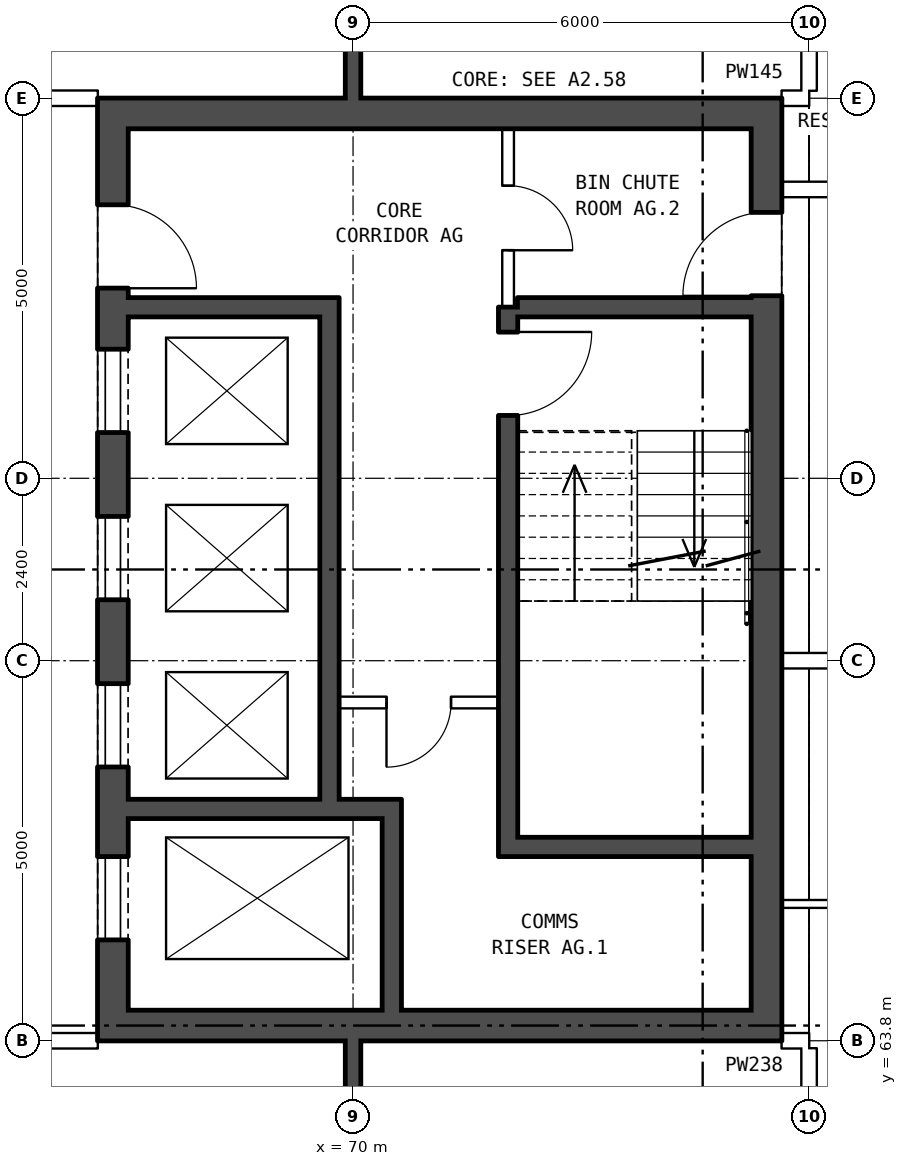
"""IFC4 building model, lengths in metres.
Left out: names, types, materials, properties, quantities, classifications, styles, units other than length and angle.
Written with IfcOpenShell. Run it as: python <this file> out.ifc"""

import sys

from ifc_helpers import new_model, si_unit, direction, frame, frame_2d, origin, place, context, subcontext, project, spatial, rectangle, extrude, element, fill, save


model = new_model("IFC4")
c1 = context("Model", 3, precision=1e-05, world=origin(), true_north=direction((0.0, 1.0)))
c2 = subcontext(c1, "Body", "Model", "MODEL_VIEW")
j1 = project(units=[si_unit("LENGTHUNIT", "METRE"), si_unit("PLANEANGLEUNIT", "RADIAN")], contexts=[c1])
p1 = place(None, origin())
s1 = spatial("IfcSite", under=j1, at=p1, CompositionType="ELEMENT")
p2 = place(p1, origin())
s2 = spatial("IfcBuilding", under=s1, at=p2, CompositionType="ELEMENT")
p3 = place(p2, frame((0.0, 0.0, 202.8)))
s3 = spatial("IfcBuildingStorey", under=s2, at=p3, CompositionType="ELEMENT", Elevation=202.8)
p4 = place(p3, frame((66.84, 63.8, 0.0), z_axis=(0.0, 0.0, 1.0), x_axis=(0.0, 1.0, 0.0)))
e1 = element("IfcWall", 1, at=p4, inside=s3, PredefinedType="SHEAR", context=c2, shape_type="SweptSolid", body=[
    extrude(rectangle(XDim=12.4, YDim=0.4, at=frame_2d((6.2, 0.0))), origin(), (0.0, 0.0, 1.0), 2.85),
])
p5 = place(p4, frame((1.325, 0.0, 0.0)))
e2 = element("IfcOpeningElement", 2, at=p5, cuts=e1, PredefinedType="OPENING", context=c2, shape_type="SweptSolid", body=[
    extrude(rectangle(XDim=1.1, YDim=2.1, at=frame_2d((0.55, 1.05))), frame((0.0, 0.21, 0.0), z_axis=(0.0, -1.0, 0.0), x_axis=(1.0, 0.0, 0.0)), (0.0, 0.0, 1.0), 0.42),
])
p6 = place(p4, frame((3.6, 0.0, 0.0)))
e3 = element("IfcOpeningElement", 3, at=p6, cuts=e1, PredefinedType="OPENING", context=c2, shape_type="SweptSolid", body=[
    extrude(rectangle(XDim=1.1, YDim=2.1, at=frame_2d((0.55, 1.05))), frame((0.0, 0.21, 0.0), z_axis=(0.0, -1.0, 0.0), x_axis=(1.0, 0.0, 0.0)), (0.0, 0.0, 1.0), 0.42),
])
p7 = place(p4, frame((5.8, 0.0, 0.0)))
e4 = element("IfcOpeningElement", 4, at=p7, cuts=e1, PredefinedType="OPENING", context=c2, shape_type="SweptSolid", body=[
    extrude(rectangle(XDim=1.1, YDim=2.1, at=frame_2d((0.55, 1.05))), frame((0.0, 0.21, 0.0), z_axis=(0.0, -1.0, 0.0), x_axis=(1.0, 0.0, 0.0)), (0.0, 0.0, 1.0), 0.42),
])
p8 = place(p4, frame((8.0, 0.0, 0.0)))
e5 = element("IfcOpeningElement", 5, at=p8, cuts=e1, PredefinedType="OPENING", context=c2, shape_type="SweptSolid", body=[
    extrude(rectangle(XDim=1.1, YDim=2.1, at=frame_2d((0.55, 1.05))), frame((0.0, 0.21, 0.0), z_axis=(0.0, -1.0, 0.0), x_axis=(1.0, 0.0, 0.0)), (0.0, 0.0, 1.0), 0.42),
])
p9 = place(p4, frame((9.9, 0.0, 0.0)))
e6 = element("IfcOpeningElement", 6, at=p9, cuts=e1, PredefinedType="OPENING", context=c2, shape_type="SweptSolid", body=[
    extrude(rectangle(XDim=1.1, YDim=2.1, at=frame_2d((0.55, 1.05))), frame((0.0, 0.21, 0.0), z_axis=(0.0, -1.0, 0.0), x_axis=(1.0, 0.0, 0.0)), (0.0, 0.0, 1.0), 0.42),
])
p10 = place(p3, frame((75.44, 63.8, 0.0), z_axis=(0.0, 0.0, 1.0), x_axis=(0.0, 1.0, 0.0)))
e7 = element("IfcWall", 7, at=p10, inside=s3, PredefinedType="SHEAR", context=c2, shape_type="SweptSolid", body=[
    extrude(rectangle(XDim=12.4, YDim=0.4, at=frame_2d((6.2, 0.0))), origin(), (0.0, 0.0, 1.0), 2.85),
])
p11 = place(p10, frame((9.8, 0.0, 0.0)))
e8 = element("IfcOpeningElement", 8, at=p11, cuts=e7, PredefinedType="OPENING", context=c2, shape_type="SweptSolid", body=[
    extrude(rectangle(XDim=1.1, YDim=2.1, at=frame_2d((0.55, 1.05))), frame((0.0, 0.21, 0.0), z_axis=(0.0, -1.0, 0.0), x_axis=(1.0, 0.0, 0.0)), (0.0, 0.0, 1.0), 0.42),
])
for number, where, z_axis, x_axis in (
    (9, (67.04, 64.0, 0.0), (0.0, 0.0, 1.0), (1.0, 0.0, 0.0)),
    (10, (67.04, 76.0, 0.0), (0.0, 0.0, 1.0), (1.0, 0.0, 0.0)),
):
    element("IfcWall", number, at=place(p3, frame(where, z_axis=z_axis, x_axis=x_axis)), inside=s3, PredefinedType="SHEAR", context=c2, shape_type="SweptSolid", body=[
        extrude(rectangle(XDim=8.2, YDim=0.4, at=frame_2d((4.1, 0.0))), origin(), (0.0, 0.0, 1.0), 2.85),
    ])
p12 = place(p3, frame((72.165, 66.35, 0.0), z_axis=(0.0, 0.0, 1.0), x_axis=(1.0, 0.0, 0.0)))
e11 = element("IfcWall", 11, at=p12, inside=s3, PredefinedType="SHEAR", context=c2, shape_type="SweptSolid", body=[
    extrude(rectangle(XDim=3.075, YDim=0.25, at=frame_2d((1.538, 0.0))), origin(), (0.0, 0.0, 1.0), 2.85),
])
p13 = place(p3, frame((67.04, 66.85, 0.0), z_axis=(0.0, 0.0, 1.0), x_axis=(1.0, 0.0, 0.0)))
e12 = element("IfcWall", 12, at=p13, inside=s3, PredefinedType="SHEAR", context=c2, shape_type="SweptSolid", body=[
    extrude(rectangle(XDim=3.595, YDim=0.25, at=frame_2d((1.797, 0.0))), origin(), (0.0, 0.0, 1.0), 2.85),
])
p14 = place(p3, frame((69.815, 68.25, 0.0), z_axis=(0.0, 0.0, 1.0), x_axis=(1.0, 0.0, 0.0)))
e13 = element("IfcWall", 13, at=p14, inside=s3, PredefinedType="PARTITIONING", context=c2, shape_type="SweptSolid", body=[
    extrude(rectangle(XDim=2.1, YDim=0.15, at=frame_2d((1.05, 0.0))), origin(), (0.0, 0.0, 1.0), 2.85),
])
p15 = place(p14, frame((0.625, 0.0, 0.0)))
e14 = element("IfcOpeningElement", 14, at=p15, cuts=e13, PredefinedType="OPENING", context=c2, shape_type="SweptSolid", body=[
    extrude(rectangle(XDim=0.85, YDim=2.1, at=frame_2d((0.425, 1.05))), frame((0.0, 0.085, 0.0), z_axis=(0.0, -1.0, 0.0), x_axis=(1.0, 0.0, 0.0)), (0.0, 0.0, 1.0), 0.17),
])
p16 = place(p3, frame((67.04, 73.45, 0.0), z_axis=(0.0, 0.0, 1.0), x_axis=(1.0, 0.0, 0.0)))
e15 = element("IfcWall", 15, at=p16, inside=s3, PredefinedType="SHEAR", context=c2, shape_type="SweptSolid", body=[
    extrude(rectangle(XDim=2.525, YDim=0.25, at=frame_2d((1.262, 0.0))), origin(), (0.0, 0.0, 1.0), 2.85),
])
p17 = place(p3, frame((72.165, 73.45, 0.0), z_axis=(0.0, 0.0, 1.0), x_axis=(1.0, 0.0, 0.0)))
e16 = element("IfcWall", 16, at=p17, inside=s3, PredefinedType="SHEAR", context=c2, shape_type="SweptSolid", body=[
    extrude(rectangle(XDim=3.075, YDim=0.25, at=frame_2d((1.538, 0.0))), origin(), (0.0, 0.0, 1.0), 2.85),
])
p18 = place(p3, frame((69.69, 66.975, 0.0), z_axis=(0.0, 0.0, 1.0), x_axis=(0.0, 1.0, 0.0)))
e17 = element("IfcWall", 17, at=p18, inside=s3, PredefinedType="SHEAR", context=c2, shape_type="SweptSolid", body=[
    extrude(rectangle(XDim=6.6, YDim=0.25, at=frame_2d((3.3, 0.0))), origin(), (0.0, 0.0, 1.0), 2.85),
])
p19 = place(p3, frame((70.51, 64.2, 0.0), z_axis=(0.0, 0.0, 1.0), x_axis=(0.0, 1.0, 0.0)))
e18 = element("IfcWall", 18, at=p19, inside=s3, PredefinedType="SHEAR", context=c2, shape_type="SweptSolid", body=[
    extrude(rectangle(XDim=2.525, YDim=0.25, at=frame_2d((1.263, 0.0))), origin(), (0.0, 0.0, 1.0), 2.85),
])
p20 = place(p3, frame((72.04, 66.225, 0.0), z_axis=(0.0, 0.0, 1.0), x_axis=(0.0, 1.0, 0.0)))
e19 = element("IfcWall", 19, at=p20, inside=s3, PredefinedType="SHEAR", context=c2, shape_type="SweptSolid", body=[
    extrude(rectangle(XDim=7.225, YDim=0.25, at=frame_2d((3.612, 0.0))), origin(), (0.0, 0.0, 1.0), 2.85),
])
p21 = place(p20, frame((5.8, 0.0, 0.0)))
e20 = element("IfcOpeningElement", 20, at=p21, cuts=e19, PredefinedType="OPENING", context=c2, shape_type="SweptSolid", body=[
    extrude(rectangle(XDim=1.1, YDim=2.1, at=frame_2d((0.55, 1.05))), frame((0.0, 0.135, 0.0), z_axis=(0.0, -1.0, 0.0), x_axis=(1.0, 0.0, 0.0)), (0.0, 0.0, 1.0), 0.27),
])
p22 = place(p3, frame((72.04, 73.45, 0.0), z_axis=(0.0, 0.0, 1.0), x_axis=(0.0, 1.0, 0.0)))
e21 = element("IfcWall", 21, at=p22, inside=s3, PredefinedType="PARTITIONING", context=c2, shape_type="SweptSolid", body=[
    extrude(rectangle(XDim=2.35, YDim=0.15, at=frame_2d((1.175, 0.0))), origin(), (0.0, 0.0, 1.0), 2.85),
])
p23 = place(p22, frame((0.75, 0.0, 0.0)))
e22 = element("IfcOpeningElement", 22, at=p23, cuts=e21, PredefinedType="OPENING", context=c2, shape_type="SweptSolid", body=[
    extrude(rectangle(XDim=0.85, YDim=2.1, at=frame_2d((0.425, 1.05))), frame((0.0, 0.085, 0.0), z_axis=(0.0, -1.0, 0.0), x_axis=(1.0, 0.0, 0.0)), (0.0, 0.0, 1.0), 0.17),
])
p24 = place(p3, frame((63.64, 63.8, 0.0), z_axis=(0.0, 0.0, 1.0), x_axis=(1.0, 0.0, 0.0)))
e23 = element("IfcWall", 23, at=p24, inside=s3, PredefinedType="PARTITIONING", context=c2, shape_type="SweptSolid", body=[
    extrude(rectangle(XDim=3.0, YDim=0.2, at=frame_2d((1.5, 0.0))), origin(), (0.0, 0.0, 1.0), 2.85),
])
p25 = place(p24, frame((1.18, 0.0, 0.0)))
e24 = element("IfcOpeningElement", 24, at=p25, cuts=e23, PredefinedType="OPENING", context=c2, shape_type="SweptSolid", body=[
    extrude(rectangle(XDim=1.0, YDim=2.1, at=frame_2d((0.5, 1.05))), frame((0.0, 0.11, 0.0), z_axis=(0.0, -1.0, 0.0), x_axis=(1.0, 0.0, 0.0)), (0.0, 0.0, 1.0), 0.22),
])
p26 = place(p3, frame((75.64, 63.8, 0.0), z_axis=(0.0, 0.0, 1.0), x_axis=(1.0, 0.0, 0.0)))
e25 = element("IfcWall", 25, at=p26, inside=s3, PredefinedType="PARTITIONING", context=c2, shape_type="SweptSolid", body=[
    extrude(rectangle(XDim=0.36, YDim=0.2, at=frame_2d((0.18, 0.0))), origin(), (0.0, 0.0, 1.0), 2.85),
])
p27 = place(p3, frame((75.64, 65.6, 0.0), z_axis=(0.0, 0.0, 1.0), x_axis=(1.0, 0.0, 0.0)))
e26 = element("IfcWall", 26, at=p27, inside=s3, PredefinedType="PARTITIONING", context=c2, shape_type="SweptSolid", body=[
    extrude(rectangle(XDim=3.798, YDim=0.1, at=frame_2d((1.899, 0.0))), origin(), (0.0, 0.0, 1.0), 2.85),
])
p28 = place(p3, frame((75.64, 68.8, 0.0), z_axis=(0.0, 0.0, 1.0), x_axis=(1.0, 0.0, 0.0)))
e27 = element("IfcWall", 27, at=p28, inside=s3, PredefinedType="PARTITIONING", context=c2, shape_type="SweptSolid", body=[
    extrude(rectangle(XDim=55.72, YDim=0.2, at=frame_2d((27.86, 0.0))), origin(), (0.0, 0.0, 1.0), 2.85),
])
p29 = place(p28, frame((5.191, 0.0, 0.0)))
e28 = element("IfcOpeningElement", 28, at=p29, cuts=e27, PredefinedType="OPENING", context=c2, shape_type="SweptSolid", body=[
    extrude(rectangle(XDim=1.0, YDim=2.1, at=frame_2d((0.5, 1.05))), frame((0.0, 0.11, 0.0), z_axis=(0.0, -1.0, 0.0), x_axis=(1.0, 0.0, 0.0)), (0.0, 0.0, 1.0), 0.22),
])
p30 = place(p28, frame((12.241, 0.0, 0.0)))
e29 = element("IfcOpeningElement", 29, at=p30, cuts=e27, PredefinedType="OPENING", context=c2, shape_type="SweptSolid", body=[
    extrude(rectangle(XDim=1.0, YDim=2.1, at=frame_2d((0.5, 1.05))), frame((0.0, 0.11, 0.0), z_axis=(0.0, -1.0, 0.0), x_axis=(1.0, 0.0, 0.0)), (0.0, 0.0, 1.0), 0.22),
])
p31 = place(p28, frame((22.553, 0.0, 0.0)))
e30 = element("IfcOpeningElement", 30, at=p31, cuts=e27, PredefinedType="OPENING", context=c2, shape_type="SweptSolid", body=[
    extrude(rectangle(XDim=1.0, YDim=2.1, at=frame_2d((0.5, 1.05))), frame((0.0, 0.11, 0.0), z_axis=(0.0, -1.0, 0.0), x_axis=(1.0, 0.0, 0.0)), (0.0, 0.0, 1.0), 0.22),
])
p32 = place(p28, frame((32.866, 0.0, 0.0)))
e31 = element("IfcOpeningElement", 31, at=p32, cuts=e27, PredefinedType="OPENING", context=c2, shape_type="SweptSolid", body=[
    extrude(rectangle(XDim=1.0, YDim=2.1, at=frame_2d((0.5, 1.05))), frame((0.0, 0.11, 0.0), z_axis=(0.0, -1.0, 0.0), x_axis=(1.0, 0.0, 0.0)), (0.0, 0.0, 1.0), 0.22),
])
p33 = place(p28, frame((36.303, 0.0, 0.0)))
e32 = element("IfcOpeningElement", 32, at=p33, cuts=e27, PredefinedType="OPENING", context=c2, shape_type="SweptSolid", body=[
    extrude(rectangle(XDim=1.0, YDim=2.1, at=frame_2d((0.5, 1.05))), frame((0.0, 0.11, 0.0), z_axis=(0.0, -1.0, 0.0), x_axis=(1.0, 0.0, 0.0)), (0.0, 0.0, 1.0), 0.22),
])
p34 = place(p28, frame((43.178, 0.0, 0.0)))
e33 = element("IfcOpeningElement", 33, at=p34, cuts=e27, PredefinedType="OPENING", context=c2, shape_type="SweptSolid", body=[
    extrude(rectangle(XDim=1.0, YDim=2.1, at=frame_2d((0.5, 1.05))), frame((0.0, 0.11, 0.0), z_axis=(0.0, -1.0, 0.0), x_axis=(1.0, 0.0, 0.0)), (0.0, 0.0, 1.0), 0.22),
])
p35 = place(p28, frame((50.053, 0.0, 0.0)))
e34 = element("IfcOpeningElement", 34, at=p35, cuts=e27, PredefinedType="OPENING", context=c2, shape_type="SweptSolid", body=[
    extrude(rectangle(XDim=1.0, YDim=2.1, at=frame_2d((0.5, 1.05))), frame((0.0, 0.11, 0.0), z_axis=(0.0, -1.0, 0.0), x_axis=(1.0, 0.0, 0.0)), (0.0, 0.0, 1.0), 0.22),
])
p36 = place(p3, frame((75.64, 75.0, 0.0), z_axis=(0.0, 0.0, 1.0), x_axis=(1.0, 0.0, 0.0)))
e35 = element("IfcWall", 35, at=p36, inside=s3, PredefinedType="PARTITIONING", context=c2, shape_type="SweptSolid", body=[
    extrude(rectangle(XDim=7.585, YDim=0.2, at=frame_2d((3.792, 0.0))), origin(), (0.0, 0.0, 1.0), 2.85),
])
p37 = place(p36, frame((3.343, 0.0, 0.0)))
e36 = element("IfcOpeningElement", 36, at=p37, cuts=e35, PredefinedType="OPENING", context=c2, shape_type="SweptSolid", body=[
    extrude(rectangle(XDim=0.9, YDim=2.1, at=frame_2d((0.45, 1.05))), frame((0.0, 0.11, 0.0), z_axis=(0.0, -1.0, 0.0), x_axis=(1.0, 0.0, 0.0)), (0.0, 0.0, 1.0), 0.22),
])
p38 = place(p3, frame((63.64, 76.2, 0.0), z_axis=(0.0, 0.0, 1.0), x_axis=(1.0, 0.0, 0.0)))
e37 = element("IfcWall", 37, at=p38, inside=s3, PredefinedType="PARTITIONING", context=c2, shape_type="SweptSolid", body=[
    extrude(rectangle(XDim=3.0, YDim=0.2, at=frame_2d((1.5, 0.0))), origin(), (0.0, 0.0, 1.0), 2.85),
])
p39 = place(p38, frame((1.18, 0.0, 0.0)))
e38 = element("IfcOpeningElement", 38, at=p39, cuts=e37, PredefinedType="OPENING", context=c2, shape_type="SweptSolid", body=[
    extrude(rectangle(XDim=1.0, YDim=2.1, at=frame_2d((0.5, 1.05))), frame((0.0, 0.11, 0.0), z_axis=(0.0, -1.0, 0.0), x_axis=(1.0, 0.0, 0.0)), (0.0, 0.0, 1.0), 0.22),
])
p40 = place(p3, frame((75.64, 76.2, 0.0), z_axis=(0.0, 0.0, 1.0), x_axis=(1.0, 0.0, 0.0)))
e39 = element("IfcWall", 39, at=p40, inside=s3, PredefinedType="PARTITIONING", context=c2, shape_type="SweptSolid", body=[
    extrude(rectangle(XDim=0.36, YDim=0.2, at=frame_2d((0.18, 0.0))), origin(), (0.0, 0.0, 1.0), 2.85),
])
p41 = place(p3, frame((70.0, 54.36, 0.0), z_axis=(0.0, 0.0, 1.0), x_axis=(0.0, 1.0, 0.0)))
e40 = element("IfcWall", 40, at=p41, inside=s3, PredefinedType="SOLIDWALL", context=c2, shape_type="SweptSolid", body=[
    extrude(rectangle(XDim=9.44, YDim=0.2, at=frame_2d((4.72, 0.0))), origin(), (0.0, 0.0, 1.0), 2.85),
])
p42 = place(p41, frame((2.32, 0.0, 0.0)))
e41 = element("IfcOpeningElement", 41, at=p42, cuts=e40, PredefinedType="OPENING", context=c2, shape_type="SweptSolid", body=[
    extrude(rectangle(XDim=0.9, YDim=2.1, at=frame_2d((0.45, 1.05))), frame((0.0, 0.11, 0.0), z_axis=(0.0, -1.0, 0.0), x_axis=(1.0, 0.0, 0.0)), (0.0, 0.0, 1.0), 0.22),
])
p43 = place(p41, frame((7.39, 0.0, 0.0)))
e42 = element("IfcOpeningElement", 42, at=p43, cuts=e40, PredefinedType="OPENING", context=c2, shape_type="SweptSolid", body=[
    extrude(rectangle(XDim=0.8, YDim=2.1, at=frame_2d((0.4, 1.05))), frame((0.0, 0.11, 0.0), z_axis=(0.0, -1.0, 0.0), x_axis=(1.0, 0.0, 0.0)), (0.0, 0.0, 1.0), 0.22),
])
p44 = place(p3, frame((70.0, 76.2, 0.0), z_axis=(0.0, 0.0, 1.0), x_axis=(0.0, 1.0, 0.0)))
e43 = element("IfcWall", 43, at=p44, inside=s3, PredefinedType="SOLIDWALL", context=c2, shape_type="SweptSolid", body=[
    extrude(rectangle(XDim=9.44, YDim=0.2, at=frame_2d((4.72, 0.0))), origin(), (0.0, 0.0, 1.0), 2.85),
])
p45 = place(p44, frame((5.92, 0.0, 0.0)))
e44 = element("IfcOpeningElement", 44, at=p45, cuts=e43, PredefinedType="OPENING", context=c2, shape_type="SweptSolid", body=[
    extrude(rectangle(XDim=0.9, YDim=2.1, at=frame_2d((0.45, 1.05))), frame((0.0, 0.11, 0.0), z_axis=(0.0, -1.0, 0.0), x_axis=(1.0, 0.0, 0.0)), (0.0, 0.0, 1.0), 0.22),
])
p46 = place(p44, frame((1.25, 0.0, 0.0)))
e45 = element("IfcOpeningElement", 45, at=p46, cuts=e43, PredefinedType="OPENING", context=c2, shape_type="SweptSolid", body=[
    extrude(rectangle(XDim=0.8, YDim=2.1, at=frame_2d((0.4, 1.05))), frame((0.0, 0.11, 0.0), z_axis=(0.0, -1.0, 0.0), x_axis=(1.0, 0.0, 0.0)), (0.0, 0.0, 1.0), 0.22),
])
for number, where, z_axis, x_axis in (
    (46, (76.0, 54.36, 0.0), (0.0, 0.0, 1.0), (0.0, 1.0, 0.0)),
    (47, (76.0, 76.3, 0.0), (0.0, 0.0, 1.0), (0.0, 1.0, 0.0)),
):
    element("IfcWall", number, at=place(p3, frame(where, z_axis=z_axis, x_axis=x_axis)), inside=s3, PredefinedType="PARTITIONING", context=c2, shape_type="SweptSolid", body=[
        extrude(rectangle(XDim=9.34, YDim=0.2, at=frame_2d((4.67, 0.0))), origin(), (0.0, 0.0, 1.0), 2.85),
    ])
p47 = place(p5, origin())
e48 = element("IfcDoor", 48, at=p47, inside=s3, OperationType="DOUBLE_DOOR_SLIDING", PredefinedType="DOOR", context=c2, shape_type="SweptSolid", body=[
    extrude(rectangle(XDim=1.1, YDim=2.1, at=frame_2d((0.55, 1.05))), frame((0.0, -0.135, 0.0), z_axis=(0.0, -1.0, 0.0), x_axis=(1.0, 0.0, 0.0)), (0.0, 0.0, 1.0), 0.05),
])
fill(e2, e48)
p48 = place(p6, origin())
e49 = element("IfcDoor", 49, at=p48, inside=s3, OperationType="DOUBLE_DOOR_SLIDING", PredefinedType="DOOR", context=c2, shape_type="SweptSolid", body=[
    extrude(rectangle(XDim=1.1, YDim=2.1, at=frame_2d((0.55, 1.05))), frame((0.0, -0.135, 0.0), z_axis=(0.0, -1.0, 0.0), x_axis=(1.0, 0.0, 0.0)), (0.0, 0.0, 1.0), 0.05),
])
fill(e3, e49)
p49 = place(p7, origin())
e50 = element("IfcDoor", 50, at=p49, inside=s3, OperationType="DOUBLE_DOOR_SLIDING", PredefinedType="DOOR", context=c2, shape_type="SweptSolid", body=[
    extrude(rectangle(XDim=1.1, YDim=2.1, at=frame_2d((0.55, 1.05))), frame((0.0, -0.135, 0.0), z_axis=(0.0, -1.0, 0.0), x_axis=(1.0, 0.0, 0.0)), (0.0, 0.0, 1.0), 0.05),
])
fill(e4, e50)
p50 = place(p8, origin())
e51 = element("IfcDoor", 51, at=p50, inside=s3, OperationType="DOUBLE_DOOR_SLIDING", PredefinedType="DOOR", context=c2, shape_type="SweptSolid", body=[
    extrude(rectangle(XDim=1.1, YDim=2.1, at=frame_2d((0.55, 1.05))), frame((0.0, -0.135, 0.0), z_axis=(0.0, -1.0, 0.0), x_axis=(1.0, 0.0, 0.0)), (0.0, 0.0, 1.0), 0.05),
])
fill(e5, e51)
p51 = place(p9, frame((1.1, 0.0, 0.0), z_axis=(0.0, 0.0, 1.0), x_axis=(-1.0, 0.0, 0.0)))
e52 = element("IfcDoor", 52, at=p51, inside=s3, OperationType="SINGLE_SWING_RIGHT", PredefinedType="DOOR", context=c2, shape_type="SweptSolid", body=[
    extrude(rectangle(XDim=1.1, YDim=2.1, at=frame_2d((0.55, 1.05))), frame((0.0, 0.185, 0.0), z_axis=(0.0, -1.0, 0.0), x_axis=(1.0, 0.0, 0.0)), (0.0, 0.0, 1.0), 0.05),
])
fill(e6, e52)
p52 = place(p21, frame((1.1, 0.0, 0.0), z_axis=(0.0, 0.0, 1.0), x_axis=(-1.0, 0.0, 0.0)))
e53 = element("IfcDoor", 53, at=p52, inside=s3, OperationType="SINGLE_SWING_LEFT", PredefinedType="DOOR", context=c2, shape_type="SweptSolid", body=[
    extrude(rectangle(XDim=1.1, YDim=2.1, at=frame_2d((0.55, 1.05))), frame((0.0, 0.025, 0.0), z_axis=(0.0, -1.0, 0.0), x_axis=(1.0, 0.0, 0.0)), (0.0, 0.0, 1.0), 0.05),
])
fill(e20, e53)
p53 = place(p15, frame((0.85, 0.0, 0.0), z_axis=(0.0, 0.0, 1.0), x_axis=(-1.0, 0.0, 0.0)))
e54 = element("IfcDoor", 54, at=p53, inside=s3, OperationType="SINGLE_SWING_RIGHT", PredefinedType="DOOR", context=c2, shape_type="SweptSolid", body=[
    extrude(rectangle(XDim=0.85, YDim=2.1, at=frame_2d((0.425, 1.05))), frame((0.0, 0.025, 0.0), z_axis=(0.0, -1.0, 0.0), x_axis=(1.0, 0.0, 0.0)), (0.0, 0.0, 1.0), 0.05),
])
fill(e14, e54)
p54 = place(p23, frame((0.85, 0.0, 0.0), z_axis=(0.0, 0.0, 1.0), x_axis=(-1.0, 0.0, 0.0)))
e55 = element("IfcDoor", 55, at=p54, inside=s3, OperationType="SINGLE_SWING_RIGHT", PredefinedType="DOOR", context=c2, shape_type="SweptSolid", body=[
    extrude(rectangle(XDim=0.85, YDim=2.1, at=frame_2d((0.425, 1.05))), frame((0.0, 0.025, 0.0), z_axis=(0.0, -1.0, 0.0), x_axis=(1.0, 0.0, 0.0)), (0.0, 0.0, 1.0), 0.05),
])
fill(e22, e55)
p55 = place(p11, origin())
e56 = element("IfcDoor", 56, at=p55, inside=s3, OperationType="SINGLE_SWING_LEFT", PredefinedType="DOOR", context=c2, shape_type="SweptSolid", body=[
    extrude(rectangle(XDim=1.1, YDim=2.1, at=frame_2d((0.55, 1.05))), frame((0.0, 0.185, 0.0), z_axis=(0.0, -1.0, 0.0), x_axis=(1.0, 0.0, 0.0)), (0.0, 0.0, 1.0), 0.05),
])
fill(e8, e56)
save(model, sys.argv[1])
